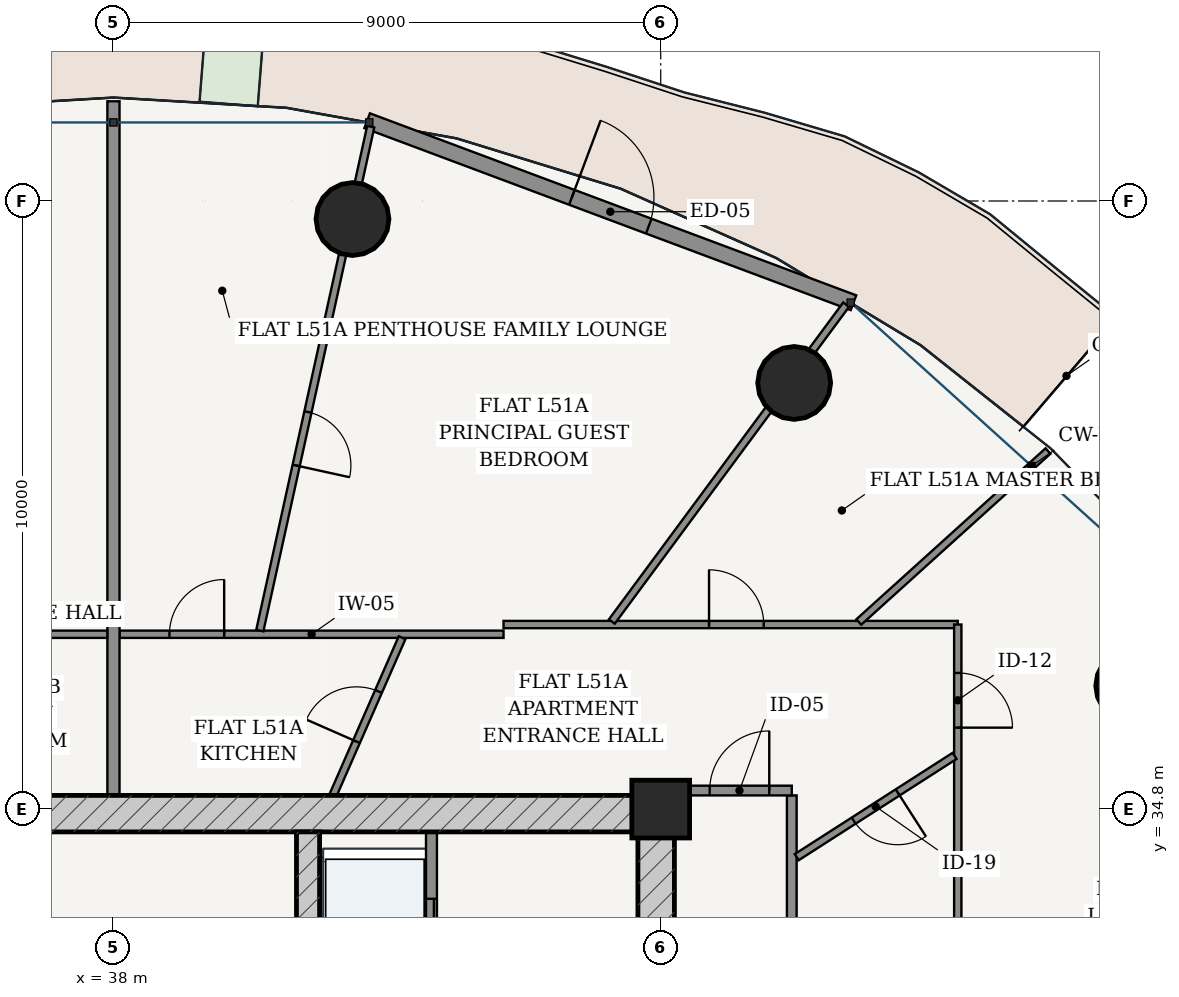
"""IFC4 building model, lengths in metres.
Left out: names, types, materials, properties, quantities, classifications, styles, units other than length and angle.
Written with IfcOpenShell. Run it as: python <this file> out.ifc"""

import sys

from ifc_helpers import new_model, si_unit, direction, frame, frame_2d, origin, origin_2d, place, context, subcontext, project, spatial, rectangle, hollow_circle, extrude, source, transform, mapped, element, fill, save


model = new_model("IFC4")
c1 = context("Model", 3, precision=1e-05, world=origin(), true_north=direction((-0.2419218956, 0.970295726276)))
c2 = subcontext(c1, "Body", "Model", "MODEL_VIEW")
j1 = project(units=[si_unit("LENGTHUNIT", "METRE"), si_unit("PLANEANGLEUNIT", "RADIAN")], contexts=[c1])
p1 = place(None, origin())
s1 = spatial("IfcSite", under=j1, at=p1, CompositionType="ELEMENT")
p2 = place(p1, origin())
s2 = spatial("IfcBuilding", under=s1, at=p2, CompositionType="ELEMENT")
p3 = place(p2, frame((0.0, 0.0, 194.9)))
s3 = spatial("IfcBuildingStorey", under=s2, at=p3, CompositionType="ELEMENT", Elevation=194.9)
p4 = place(p3, frame((47.0, 34.8, 0.0), z_axis=(0.0, 0.0, 1.0), x_axis=(1.0, 0.0, 0.0)))
e1 = element("IfcColumn", 1, at=p4, inside=s3, PredefinedType="COLUMN", context=c2, shape_type="SweptSolid", body=[
    extrude(rectangle(XDim=0.95, YDim=0.95, at=origin_2d()), origin(), (0.0, 0.0, 1.0), 3.7),
])
p5 = place(p3, frame((28.775, 34.725, 0.0), z_axis=(0.0, 0.0, 1.0), x_axis=(1.0, 0.0, 0.0)))
e2 = element("IfcWall", 2, at=p5, inside=s3, PredefinedType="SHEAR", context=c2, shape_type="SweptSolid", body=[
    extrude(rectangle(XDim=18.45, YDim=0.6, at=frame_2d((9.225, 0.0))), origin(), (0.0, 0.0, 1.0), 3.435),
])
p6 = place(p3, frame((46.925, 19.175, 0.0), z_axis=(0.0, 0.0, 1.0), x_axis=(0.0, 1.0, 0.0)))
e3 = element("IfcWall", 3, at=p6, inside=s3, PredefinedType="SHEAR", context=c2, shape_type="SweptSolid", body=[
    extrude(rectangle(XDim=15.25, YDim=0.6, at=frame_2d((7.625, 0.0))), origin(), (0.0, 0.0, 1.0), 3.435),
])
p7 = place(p6, frame((9.875, 0.0, 0.0)))
e4 = element("IfcOpeningElement", 4, at=p7, cuts=e3, PredefinedType="OPENING", context=c2, shape_type="SweptSolid", body=[
    extrude(rectangle(XDim=1.5, YDim=2.2, at=frame_2d((0.75, 1.1))), frame((0.0, 0.31, 0.0), z_axis=(0.0, -1.0, 0.0), x_axis=(1.0, 0.0, 0.0)), (0.0, 0.0, 1.0), 0.62),
])
p8 = place(p3, frame((41.2, 19.175, 0.0), z_axis=(0.0, 0.0, 1.0), x_axis=(0.0, 1.0, 0.0)))
e5 = element("IfcWall", 5, at=p8, inside=s3, PredefinedType="SHEAR", context=c2, shape_type="SweptSolid", body=[
    extrude(rectangle(XDim=15.25, YDim=0.38, at=frame_2d((7.625, 0.0))), origin(), (0.0, 0.0, 1.0), 3.435),
])
p9 = place(p8, frame((7.8, 0.0, 0.0)))
e6 = element("IfcOpeningElement", 6, at=p9, cuts=e5, PredefinedType="OPENING", context=c2, shape_type="SweptSolid", body=[
    extrude(rectangle(XDim=1.05, YDim=2.15, at=frame_2d((0.525, 1.075))), frame((0.0, 0.2, 0.0), z_axis=(0.0, -1.0, 0.0), x_axis=(1.0, 0.0, 0.0)), (0.0, 0.0, 1.0), 0.4),
])
for number, where, z_axis, x_axis in (
    (7, (54.754, 36.828, 0.0), (0.0, 0.0, 1.0), (1.0, 0.0, 0.0)),
    (8, (49.195, 41.808, 0.0), (0.0, 0.0, 1.0), (1.0, 0.0, 0.0)),
    (9, (41.931, 44.503, 0.0), (0.0, 0.0, 1.0), (1.0, 0.0, 0.0)),
):
    element("IfcColumn", number, at=place(p3, frame(where, z_axis=z_axis, x_axis=x_axis)), inside=s3, PredefinedType="COLUMN", context=c2, shape_type="SweptSolid", body=[
        extrude(hollow_circle(Radius=0.6, WallThickness=0.038, at=origin_2d()), origin(), (0.0, 0.0, 1.0), 3.7),
    ])
p10 = place(p3, frame((50.17, 43.127, 0.0), z_axis=(0.0, 0.0, 1.0), x_axis=(-0.936556918375, 0.350515532672, 0.0)))
e10 = element("IfcWall", 10, at=p10, inside=s3, PredefinedType="SOLIDWALL", context=c2, shape_type="SweptSolid", body=[
    extrude(rectangle(XDim=8.539, YDim=0.26, at=frame_2d((4.27, 0.0))), origin(), (0.0, 0.0, 1.0), 3.435),
])
p11 = place(p10, frame((3.594, 0.0, 0.0)))
e11 = element("IfcOpeningElement", 11, at=p11, cuts=e10, PredefinedType="OPENING", context=c2, shape_type="SweptSolid", body=[
    extrude(rectangle(XDim=1.35, YDim=2.2, at=frame_2d((0.675, 1.1))), frame((0.0, 0.14, 0.0), z_axis=(0.0, -1.0, 0.0), x_axis=(1.0, 0.0, 0.0)), (0.0, 0.0, 1.0), 0.28),
])
p12 = place(p3, frame((43.23, 28.52, 0.0), z_axis=(0.0, 0.0, 1.0), x_axis=(0.0, 1.0, 0.0)))
e12 = element("IfcWall", 12, at=p12, inside=s3, PredefinedType="PARTITIONING", context=c2, shape_type="SweptSolid", body=[
    extrude(rectangle(XDim=5.905, YDim=0.18, at=frame_2d((2.953, 0.0))), origin(), (0.0, 0.0, 1.0), 3.435),
])
p13 = place(p12, frame((0.905, 0.0, 0.0)))
e13 = element("IfcOpeningElement", 13, at=p13, cuts=e12, PredefinedType="OPENING", context=c2, shape_type="SweptSolid", body=[
    extrude(rectangle(XDim=0.85, YDim=2.1, at=frame_2d((0.425, 1.05))), frame((0.0, 0.1, 0.0), z_axis=(0.0, -1.0, 0.0), x_axis=(1.0, 0.0, 0.0)), (0.0, 0.0, 1.0), 0.2),
])
p14 = place(p12, frame((3.655, 0.0, 0.0)))
e14 = element("IfcOpeningElement", 14, at=p14, cuts=e12, PredefinedType="OPENING", context=c2, shape_type="SweptSolid", body=[
    extrude(rectangle(XDim=1.15, YDim=2.2, at=frame_2d((0.575, 1.1))), frame((0.0, 0.1, 0.0), z_axis=(0.0, -1.0, 0.0), x_axis=(1.0, 0.0, 0.0)), (0.0, 0.0, 1.0), 0.2),
])
p15 = place(p3, frame((49.155, 16.725, 0.0), z_axis=(0.0, 0.0, 1.0), x_axis=(0.0, 1.0, 0.0)))
e15 = element("IfcWall", 15, at=p15, inside=s3, PredefinedType="PARTITIONING", context=c2, shape_type="SweptSolid", body=[
    extrude(rectangle(XDim=18.3, YDim=0.16, at=frame_2d((9.15, 0.0))), origin(), (0.0, 0.0, 1.0), 2.951),
])
p16 = place(p3, frame((47.225, 35.105, 0.0), z_axis=(0.0, 0.0, 1.0), x_axis=(1.0, 0.0, 0.0)))
e16 = element("IfcWall", 16, at=p16, inside=s3, PredefinedType="PARTITIONING", context=c2, shape_type="SweptSolid", body=[
    extrude(rectangle(XDim=1.93, YDim=0.16, at=frame_2d((0.965, 0.0))), origin(), (0.0, 0.0, 1.0), 3.435),
])
p17 = place(p16, frame((0.58, 0.0, 0.0)))
e17 = element("IfcOpeningElement", 17, at=p17, cuts=e16, PredefinedType="OPENING", context=c2, shape_type="SweptSolid", body=[
    extrude(rectangle(XDim=0.98, YDim=2.2, at=frame_2d((0.49, 1.1))), frame((0.0, 0.09, 0.0), z_axis=(0.0, -1.0, 0.0), x_axis=(1.0, 0.0, 0.0)), (0.0, 0.0, 1.0), 0.18),
])
p18 = place(p3, frame((38.102, 37.675, 0.0), z_axis=(0.0, 0.0, 1.0), x_axis=(1.0, 0.0, 0.0)))
e18 = element("IfcWall", 18, at=p18, inside=s3, PredefinedType="PARTITIONING", context=c2, shape_type="SweptSolid", body=[
    extrude(rectangle(XDim=6.313, YDim=0.12, at=frame_2d((3.156, 0.0))), origin(), (0.0, 0.0, 1.0), 2.951),
])
p19 = place(p18, frame((0.819, 0.0, 0.0)))
e19 = element("IfcOpeningElement", 19, at=p19, cuts=e18, PredefinedType="OPENING", context=c2, shape_type="SweptSolid", body=[
    extrude(rectangle(XDim=0.9, YDim=2.15, at=frame_2d((0.45, 1.075))), frame((0.0, 0.07, 0.0), z_axis=(0.0, -1.0, 0.0), x_axis=(1.0, 0.0, 0.0)), (0.0, 0.0, 1.0), 0.14),
])
p20 = place(p3, frame((44.415, 37.835, 0.0), z_axis=(0.0, 0.0, 1.0), x_axis=(1.0, 0.0, 0.0)))
e20 = element("IfcWall", 20, at=p20, inside=s3, PredefinedType="PARTITIONING", context=c2, shape_type="SweptSolid", body=[
    extrude(rectangle(XDim=7.47, YDim=0.12, at=frame_2d((3.735, 0.0))), origin(), (0.0, 0.0, 1.0), 2.951),
])
p21 = place(p20, frame((3.379, 0.0, 0.0)))
e21 = element("IfcOpeningElement", 21, at=p21, cuts=e20, PredefinedType="OPENING", context=c2, shape_type="SweptSolid", body=[
    extrude(rectangle(XDim=0.9, YDim=2.15, at=frame_2d((0.45, 1.075))), frame((0.0, 0.07, 0.0), z_axis=(0.0, -1.0, 0.0), x_axis=(1.0, 0.0, 0.0)), (0.0, 0.0, 1.0), 0.14),
])
p22 = place(p3, frame((51.885, 37.835, 0.0), z_axis=(0.0, 0.0, 1.0), x_axis=(0.0, -1.0, 0.0)))
e22 = element("IfcWall", 22, at=p22, inside=s3, PredefinedType="PARTITIONING", context=c2, shape_type="SweptSolid", body=[
    extrude(rectangle(XDim=8.437, YDim=0.12, at=frame_2d((4.219, 0.0))), origin(), (0.0, 0.0, 1.0), 2.951),
])
p23 = place(p22, frame((0.796, 0.0, 0.0)))
e23 = element("IfcOpeningElement", 23, at=p23, cuts=e22, PredefinedType="OPENING", context=c2, shape_type="SweptSolid", body=[
    extrude(rectangle(XDim=0.9, YDim=2.15, at=frame_2d((0.45, 1.075))), frame((0.0, 0.07, 0.0), z_axis=(0.0, -1.0, 0.0), x_axis=(1.0, 0.0, 0.0)), (0.0, 0.0, 1.0), 0.14),
])
p24 = place(p3, frame((50.257, 37.876, 0.0), z_axis=(0.0, 0.0, 1.0), x_axis=(0.741943837234, 0.670462036502, 0.0)))
e24 = element("IfcWall", 24, at=p24, inside=s3, PredefinedType="PARTITIONING", context=c2, shape_type="SweptSolid", body=[
    extrude(rectangle(XDim=4.194, YDim=0.12, at=frame_2d((2.097, 0.0))), origin(), (0.0, 0.0, 1.0), 2.951),
])
p25 = place(p3, frame((46.196, 37.885, 0.0), z_axis=(0.0, 0.0, 1.0), x_axis=(0.594507557292, 0.804090022524, 0.0)))
e25 = element("IfcWall", 25, at=p25, inside=s3, PredefinedType="PARTITIONING", context=c2, shape_type="SweptSolid", body=[
    extrude(rectangle(XDim=6.481, YDim=0.12, at=frame_2d((3.241, 0.0))), origin(), (0.0, 0.0, 1.0), 2.951),
])
p26 = place(p3, frame((40.407, 37.736, 0.0), z_axis=(0.0, 0.0, 1.0), x_axis=(0.214971015179, 0.97662042915, 0.0)))
e26 = element("IfcWall", 26, at=p26, inside=s3, PredefinedType="PARTITIONING", context=c2, shape_type="SweptSolid", body=[
    extrude(rectangle(XDim=8.485, YDim=0.12, at=frame_2d((4.242, 0.0))), origin(), (0.0, 0.0, 1.0), 2.951),
])
p27 = place(p26, frame((2.78, 0.0, 0.0)))
e27 = element("IfcOpeningElement", 27, at=p27, cuts=e26, PredefinedType="OPENING", context=c2, shape_type="SweptSolid", body=[
    extrude(rectangle(XDim=0.9, YDim=2.15, at=frame_2d((0.45, 1.075))), frame((0.0, 0.07, 0.0), z_axis=(0.0, -1.0, 0.0), x_axis=(1.0, 0.0, 0.0)), (0.0, 0.0, 1.0), 0.14),
])
p28 = place(p3, frame((49.237, 34.009, 0.0), z_axis=(0.0, 0.0, 1.0), x_axis=(0.841651322174, 0.540021343915, 0.0)))
e28 = element("IfcWall", 28, at=p28, inside=s3, PredefinedType="PARTITIONING", context=c2, shape_type="SweptSolid", body=[
    extrude(rectangle(XDim=3.085, YDim=0.12, at=frame_2d((1.542, 0.0))), origin(), (0.0, 0.0, 1.0), 3.11),
])
p29 = place(p28, frame((1.112, 0.0, 0.0)))
e29 = element("IfcOpeningElement", 29, at=p29, cuts=e28, PredefinedType="OPENING", context=c2, shape_type="SweptSolid", body=[
    extrude(rectangle(XDim=0.86, YDim=2.15, at=frame_2d((0.43, 1.075))), frame((0.0, 0.07, 0.0), z_axis=(0.0, -1.0, 0.0), x_axis=(1.0, 0.0, 0.0)), (0.0, 0.0, 1.0), 0.14),
])
p30 = place(p3, frame((41.61, 35.027, 0.0), z_axis=(0.0, 0.0, 1.0), x_axis=(0.401859508224, 0.915701335398, 0.0)))
e30 = element("IfcWall", 30, at=p30, inside=s3, PredefinedType="PARTITIONING", context=c2, shape_type="SweptSolid", body=[
    extrude(rectangle(XDim=2.83, YDim=0.12, at=frame_2d((1.415, 0.0))), origin(), (0.0, 0.0, 1.0), 3.435),
])
p31 = place(p30, frame((0.965, 0.0, 0.0)))
e31 = element("IfcOpeningElement", 31, at=p31, cuts=e30, PredefinedType="OPENING", context=c2, shape_type="SweptSolid", body=[
    extrude(rectangle(XDim=0.9, YDim=2.15, at=frame_2d((0.45, 1.075))), frame((0.0, 0.07, 0.0), z_axis=(0.0, -1.0, 0.0), x_axis=(1.0, 0.0, 0.0)), (0.0, 0.0, 1.0), 0.14),
])
p32 = place(p3, frame((38.0, 35.027, 0.0), z_axis=(0.0, 0.0, 1.0), x_axis=(0.0, 1.0, 0.0)))
e32 = element("IfcWall", 32, at=p32, inside=s3, PredefinedType="PARTITIONING", context=c2, shape_type="SweptSolid", body=[
    extrude(rectangle(XDim=11.413, YDim=0.2, at=frame_2d((5.707, 0.0))), origin(), (0.0, 0.0, 1.0), 2.52),
])
p33 = place(p3, frame((31.585, 37.675, 0.0), z_axis=(0.0, 0.0, 1.0), x_axis=(1.0, 0.0, 0.0)))
e33 = element("IfcWall", 33, at=p33, inside=s3, PredefinedType="PARTITIONING", context=c2, shape_type="SweptSolid", body=[
    extrude(rectangle(XDim=6.313, YDim=0.12, at=frame_2d((3.156, 0.0))), origin(), (0.0, 0.0, 1.0), 2.951),
])
m1 = source(origin(), c2, "Body", "SweptSolid", [
    extrude(rectangle(XDim=1.35, YDim=2.2, at=frame_2d((0.675, 1.1))), frame((0.0, 0.025, 0.0), z_axis=(0.0, -1.0, 0.0), x_axis=(1.0, 0.0, 0.0)), (0.0, 0.0, 1.0), 0.05),
])
p34 = place(p11, frame((1.35, 0.0, 0.0), z_axis=(0.0, 0.0, 1.0), x_axis=(-1.0, 0.0, 0.0)))
e34 = element("IfcDoor", 34, at=p34, inside=s3, OperationType="SINGLE_SWING_LEFT", PredefinedType="DOOR", context=c2, shape_type="MappedRepresentation", body=[
    mapped(m1, transform((0.0, 0.0, 0.0), scale=1.0)),
])
fill(e11, e34)
m2 = source(origin(), c2, "Body", "SweptSolid", [
    extrude(rectangle(XDim=1.15, YDim=2.2, at=frame_2d((0.575, 1.1))), frame((0.0, 0.025, 0.0), z_axis=(0.0, -1.0, 0.0), x_axis=(1.0, 0.0, 0.0)), (0.0, 0.0, 1.0), 0.05),
])
p35 = place(p14, origin())
e35 = element("IfcDoor", 35, at=p35, inside=s3, OperationType="DOUBLE_DOOR_SLIDING", PredefinedType="DOOR", context=c2, shape_type="MappedRepresentation", body=[
    mapped(m2, transform((0.0, 0.0, 0.0), scale=1.0)),
])
fill(e14, e35)
m3 = source(origin(), c2, "Body", "SweptSolid", [
    extrude(rectangle(XDim=0.98, YDim=2.2, at=frame_2d((0.49, 1.1))), frame((0.0, 0.025, 0.0), z_axis=(0.0, -1.0, 0.0), x_axis=(1.0, 0.0, 0.0)), (0.0, 0.0, 1.0), 0.05),
])
p36 = place(p17, origin())
e36 = element("IfcDoor", 36, at=p36, inside=s3, OperationType="SINGLE_SWING_RIGHT", PredefinedType="DOOR", context=c2, shape_type="MappedRepresentation", body=[
    mapped(m3, transform((0.0, 0.0, 0.0), scale=1.0)),
])
fill(e17, e36)
m4 = source(origin(), c2, "Body", "SweptSolid", [
    extrude(rectangle(XDim=0.86, YDim=2.15, at=frame_2d((0.43, 1.075))), frame((0.0, 0.025, 0.0), z_axis=(0.0, -1.0, 0.0), x_axis=(1.0, 0.0, 0.0)), (0.0, 0.0, 1.0), 0.05),
])
p37 = place(p29, frame((0.86, 0.0, 0.0), z_axis=(0.0, 0.0, 1.0), x_axis=(-1.0, 0.0, 0.0)))
e37 = element("IfcDoor", 37, at=p37, inside=s3, OperationType="SINGLE_SWING_LEFT", PredefinedType="DOOR", context=c2, shape_type="MappedRepresentation", body=[
    mapped(m4, transform((0.0, 0.0, 0.0), scale=1.0)),
])
fill(e29, e37)
m5 = source(origin(), c2, "Body", "SweptSolid", [
    extrude(rectangle(XDim=0.9, YDim=2.15, at=frame_2d((0.45, 1.075))), frame((0.0, 0.025, 0.0), z_axis=(0.0, -1.0, 0.0), x_axis=(1.0, 0.0, 0.0)), (0.0, 0.0, 1.0), 0.05),
])
p38 = place(p23, origin())
e38 = element("IfcDoor", 38, at=p38, inside=s3, OperationType="SINGLE_SWING_RIGHT", PredefinedType="DOOR", context=c2, shape_type="MappedRepresentation", body=[
    mapped(m5, transform((0.0, 0.0, 0.0), scale=1.0)),
])
fill(e23, e38)
p39 = place(p31, origin())
e39 = element("IfcDoor", 39, at=p39, inside=s3, OperationType="SINGLE_SWING_LEFT", PredefinedType="DOOR", context=c2, shape_type="MappedRepresentation", body=[
    mapped(m5, transform((0.0, 0.0, 0.0), scale=1.0)),
])
fill(e31, e39)
p40 = place(p19, origin())
e40 = element("IfcDoor", 40, at=p40, inside=s3, OperationType="SINGLE_SWING_RIGHT", PredefinedType="DOOR", context=c2, shape_type="MappedRepresentation", body=[
    mapped(m5, transform((0.0, 0.0, 0.0), scale=1.0)),
])
fill(e19, e40)
p41 = place(p21, origin())
e41 = element("IfcDoor", 41, at=p41, inside=s3, OperationType="SINGLE_SWING_LEFT", PredefinedType="DOOR", context=c2, shape_type="MappedRepresentation", body=[
    mapped(m5, transform((0.0, 0.0, 0.0), scale=1.0)),
])
fill(e21, e41)
p42 = place(p27, frame((0.9, 0.0, 0.0), z_axis=(0.0, 0.0, 1.0), x_axis=(-1.0, 0.0, 0.0)))
e42 = element("IfcDoor", 42, at=p42, inside=s3, OperationType="SINGLE_SWING_RIGHT", PredefinedType="DOOR", context=c2, shape_type="MappedRepresentation", body=[
    mapped(m5, transform((0.0, 0.0, 0.0), scale=1.0)),
])
fill(e27, e42)
save(model, sys.argv[1])
